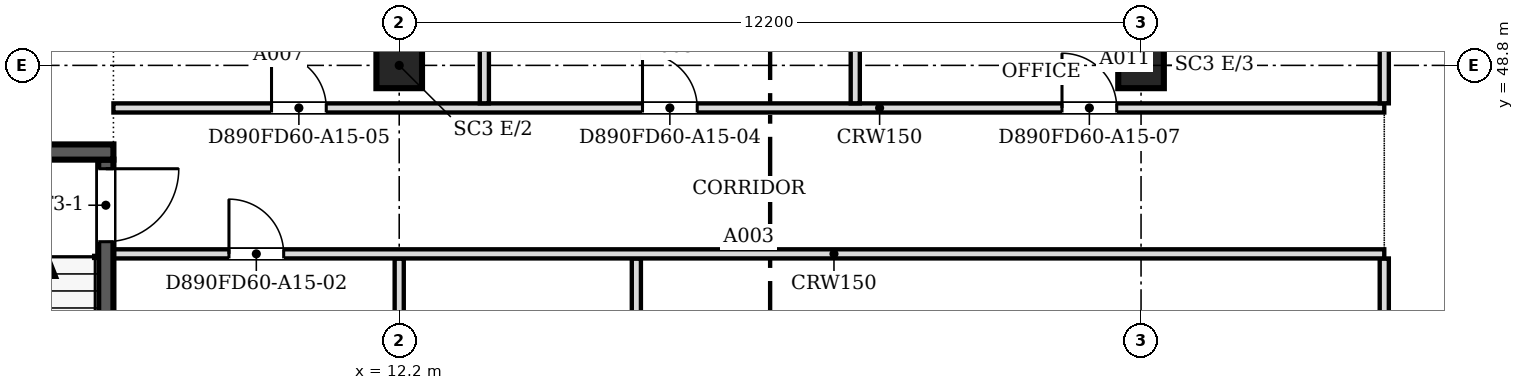
"""IFC4 building model, lengths in metres.
Left out: names, types, materials, properties, quantities, classifications, styles, units other than length and angle.
Written with IfcOpenShell. Run it as: python <this file> out.ifc"""

import sys

from ifc_helpers import new_model, si_unit, direction, frame, frame_2d, origin, origin_2d, place, context, subcontext, project, spatial, rectangle, extrude, source, transform, mapped, element, fill, save


model = new_model("IFC4")
c1 = context("Model", 3, precision=1e-05, world=origin(), true_north=direction((0.0, 1.0)))
c2 = subcontext(c1, "Body", "Model", "MODEL_VIEW")
j1 = project(units=[si_unit("LENGTHUNIT", "METRE"), si_unit("PLANEANGLEUNIT", "RADIAN")], contexts=[c1])
p1 = place(None, origin())
s1 = spatial("IfcSite", under=j1, at=p1, CompositionType="ELEMENT")
p2 = place(p1, origin())
s2 = spatial("IfcBuilding", under=s1, at=p2, CompositionType="ELEMENT")
p3 = place(p2, frame((0.0, 0.0, 166.8)))
s3 = spatial("IfcBuildingStorey", under=s2, at=p3, CompositionType="ELEMENT", Elevation=166.8)
for number, where, z_axis, x_axis in (
    (1, (12.2, 48.8, 0.0), (0.0, 0.0, 1.0), (1.0, 0.0, 0.0)),
    (2, (24.4, 48.8, 0.0), (0.0, 0.0, 1.0), (1.0, 0.0, 0.0)),
):
    element("IfcColumn", number, at=place(p3, frame(where, z_axis=z_axis, x_axis=x_axis)), inside=s3, PredefinedType="COLUMN", context=c2, shape_type="SweptSolid", body=[
        extrude(rectangle(XDim=0.75, YDim=0.75, at=origin_2d()), origin(), (0.0, 0.0, 1.0), 3.6),
    ])
p4 = place(p3, frame((3.6, 47.375, 0.0), z_axis=(0.0, 0.0, 1.0), x_axis=(1.0, 0.0, 0.0)))
e3 = element("IfcWall", 3, at=p4, inside=s3, PredefinedType="SOLIDWALL", context=c2, shape_type="SweptSolid", body=[
    extrude(rectangle(XDim=3.9, YDim=0.25, at=frame_2d((1.95, 0.0))), origin(), (0.0, 0.0, 1.0), 3.8),
])
p5 = place(p3, frame((7.375, 47.25, 0.0), z_axis=(0.0, 0.0, 1.0), x_axis=(0.0, -1.0, 0.0)))
e4 = element("IfcWall", 4, at=p5, inside=s3, PredefinedType="SOLIDWALL", context=c2, shape_type="SweptSolid", body=[
    extrude(rectangle(XDim=8.0, YDim=0.25, at=frame_2d((4.0, 0.0))), origin(), (0.0, 0.0, 1.0), 3.8),
])
m1 = source(origin(), c2, "Body", "SweptSolid", [
    extrude(rectangle(XDim=1.2, YDim=2.1, at=frame_2d((0.6, 1.05))), frame((0.0, 0.135, 0.0), z_axis=(0.0, -1.0, 0.0), x_axis=(1.0, 0.0, 0.0)), (0.0, 0.0, 1.0), 0.27),
])
p6 = place(p5, frame((0.15, 0.0, 0.0)))
e5 = element("IfcOpeningElement", 5, at=p6, cuts=e4, PredefinedType="OPENING", context=c2, shape_type="MappedRepresentation", body=[
    mapped(m1, transform((0.0, 0.0, 0.0), scale=1.0)),
])
p7 = place(p3, frame((28.4, 18.8, 0.0), z_axis=(0.0, 0.0, 1.0), x_axis=(0.0, 1.0, 0.0)))
e6 = element("IfcWall", 6, at=p7, inside=s3, PredefinedType="PARTITIONING", context=c2, shape_type="SweptSolid", body=[
    extrude(rectangle(XDim=26.824, YDim=0.15, at=frame_2d((13.412, 0.0))), origin(), (0.0, 0.0, 1.0), 3.067),
])
m2 = source(origin(), c2, "Body", "SweptSolid", [
    extrude(rectangle(XDim=0.9, YDim=2.1, at=frame_2d((0.45, 1.05))), frame((0.0, 0.085, 0.0), z_axis=(0.0, -1.0, 0.0), x_axis=(1.0, 0.0, 0.0)), (0.0, 0.0, 1.0), 0.17),
])
p8 = place(p7, frame((1.3, 0.0, 0.0)))
e7 = element("IfcOpeningElement", 7, at=p8, cuts=e6, PredefinedType="OPENING", context=c2, shape_type="MappedRepresentation", body=[
    mapped(m2, transform((0.0, 0.0, 0.0), scale=1.0)),
])
m3 = source(origin(), c2, "Body", "SweptSolid", [
    extrude(rectangle(XDim=1.0, YDim=2.1, at=frame_2d((0.5, 1.05))), frame((0.0, 0.085, 0.0), z_axis=(0.0, -1.0, 0.0), x_axis=(1.0, 0.0, 0.0)), (0.0, 0.0, 1.0), 0.17),
])
p9 = place(p7, frame((23.351, 0.0, 0.0)))
e8 = element("IfcOpeningElement", 8, at=p9, cuts=e6, PredefinedType="OPENING", context=c2, shape_type="MappedRepresentation", body=[
    mapped(m3, transform((0.0, 0.0, 0.0), scale=1.0)),
])
p10 = place(p7, frame((8.1, 0.0, 0.0)))
e9 = element("IfcOpeningElement", 9, at=p10, cuts=e6, PredefinedType="OPENING", context=c2, shape_type="MappedRepresentation", body=[
    mapped(m3, transform((0.0, 0.0, 0.0), scale=1.0)),
])
p11 = place(p7, frame((15.8, 0.0, 0.0)))
e10 = element("IfcOpeningElement", 10, at=p11, cuts=e6, PredefinedType="OPENING", context=c2, shape_type="MappedRepresentation", body=[
    mapped(m2, transform((0.0, 0.0, 0.0), scale=1.0)),
])
p12 = place(p3, frame((16.1, 39.65, 0.0), z_axis=(0.0, 0.0, 1.0), x_axis=(0.0, 1.0, 0.0)))
e11 = element("IfcWall", 11, at=p12, inside=s3, PredefinedType="PARTITIONING", context=c2, shape_type="SweptSolid", body=[
    extrude(rectangle(XDim=5.974, YDim=0.15, at=frame_2d((2.987, 0.0))), origin(), (0.0, 0.0, 1.0), 3.067),
])
p13 = place(p12, frame((2.5, 0.0, 0.0)))
e12 = element("IfcOpeningElement", 12, at=p13, cuts=e11, PredefinedType="OPENING", context=c2, shape_type="MappedRepresentation", body=[
    mapped(m2, transform((0.0, 0.0, 0.0), scale=1.0)),
])
p14 = place(p3, frame((12.2, 39.726, 0.0), z_axis=(0.0, 0.0, 1.0), x_axis=(0.0, 1.0, 0.0)))
e13 = element("IfcWall", 13, at=p14, inside=s3, PredefinedType="PARTITIONING", context=c2, shape_type="SweptSolid", body=[
    extrude(rectangle(XDim=5.898, YDim=0.15, at=frame_2d((2.949, 0.0))), origin(), (0.0, 0.0, 1.0), 3.067),
])
p15 = place(p3, frame((28.4, 45.7, 0.0), z_axis=(0.0, 0.0, 1.0), x_axis=(-1.0, 0.0, 0.0)))
e14 = element("IfcWall", 14, at=p15, inside=s3, PredefinedType="PARTITIONING", context=c2, shape_type="SweptSolid", body=[
    extrude(rectangle(XDim=20.9, YDim=0.15, at=frame_2d((10.45, 0.0))), origin(), (0.0, 0.0, 1.0), 3.067),
])
p16 = place(p15, frame((18.1, 0.0, 0.0)))
e15 = element("IfcOpeningElement", 15, at=p16, cuts=e14, PredefinedType="OPENING", context=c2, shape_type="MappedRepresentation", body=[
    mapped(m2, transform((0.0, 0.0, 0.0), scale=1.0)),
])
p17 = place(p3, frame((7.5, 48.1, 0.0), z_axis=(0.0, 0.0, 1.0), x_axis=(1.0, 0.0, 0.0)))
e16 = element("IfcWall", 16, at=p17, inside=s3, PredefinedType="PARTITIONING", context=c2, shape_type="SweptSolid", body=[
    extrude(rectangle(XDim=20.9, YDim=0.15, at=frame_2d((10.45, 0.0))), origin(), (0.0, 0.0, 1.0), 3.067),
])
p18 = place(p17, frame((8.701, 0.0, 0.0)))
e17 = element("IfcOpeningElement", 17, at=p18, cuts=e16, PredefinedType="OPENING", context=c2, shape_type="MappedRepresentation", body=[
    mapped(m2, transform((0.0, 0.0, 0.0), scale=1.0)),
])
p19 = place(p17, frame((2.6, 0.0, 0.0)))
e18 = element("IfcOpeningElement", 18, at=p19, cuts=e16, PredefinedType="OPENING", context=c2, shape_type="MappedRepresentation", body=[
    mapped(m2, transform((0.0, 0.0, 0.0), scale=1.0)),
])
p20 = place(p17, frame((15.6, 0.0, 0.0)))
e19 = element("IfcOpeningElement", 19, at=p20, cuts=e16, PredefinedType="OPENING", context=c2, shape_type="MappedRepresentation", body=[
    mapped(m2, transform((0.0, 0.0, 0.0), scale=1.0)),
])
p21 = place(p3, frame((13.6, 48.176, 0.0), z_axis=(0.0, 0.0, 1.0), x_axis=(0.0, 1.0, 0.0)))
e20 = element("IfcWall", 20, at=p21, inside=s3, PredefinedType="PARTITIONING", context=c2, shape_type="SweptSolid", body=[
    extrude(rectangle(XDim=2.924, YDim=0.15, at=frame_2d((1.462, 0.0))), origin(), (0.0, 0.0, 1.0), 3.067),
])
p22 = place(p3, frame((19.7, 48.176, 0.0), z_axis=(0.0, 0.0, 1.0), x_axis=(0.0, 1.0, 0.0)))
e21 = element("IfcWall", 21, at=p22, inside=s3, PredefinedType="PARTITIONING", context=c2, shape_type="SweptSolid", body=[
    extrude(rectangle(XDim=6.224, YDim=0.15, at=frame_2d((3.112, 0.0))), origin(), (0.0, 0.0, 1.0), 3.067),
])
p23 = place(p3, frame((28.4, 48.176, 0.0), z_axis=(0.0, 0.0, 1.0), x_axis=(0.0, 1.0, 0.0)))
e22 = element("IfcWall", 22, at=p23, inside=s3, PredefinedType="PARTITIONING", context=c2, shape_type="SweptSolid", body=[
    extrude(rectangle(XDim=2.549, YDim=0.15, at=frame_2d((1.274, 0.0))), origin(), (0.0, 0.0, 1.0), 3.067),
])
m4 = source(origin(), c2, "Body", "SweptSolid", [
    extrude(rectangle(XDim=1.2, YDim=2.1, at=frame_2d((0.6, 1.05))), frame((0.0, 0.025, 0.0), z_axis=(0.0, -1.0, 0.0), x_axis=(1.0, 0.0, 0.0)), (0.0, 0.0, 1.0), 0.05),
])
p24 = place(p6, origin())
e23 = element("IfcDoor", 23, at=p24, inside=s3, OperationType="SINGLE_SWING_LEFT", PredefinedType="DOOR", context=c2, shape_type="MappedRepresentation", body=[
    mapped(m4, transform((0.0, 0.0, 0.0), scale=1.0)),
])
fill(e5, e23)
m5 = source(origin(), c2, "Body", "SweptSolid", [
    extrude(rectangle(XDim=0.9, YDim=2.1, at=frame_2d((0.45, 1.05))), frame((0.0, 0.025, 0.0), z_axis=(0.0, -1.0, 0.0), x_axis=(1.0, 0.0, 0.0)), (0.0, 0.0, 1.0), 0.05),
])
p25 = place(p16, origin())
e24 = element("IfcDoor", 24, at=p25, inside=s3, OperationType="SINGLE_SWING_RIGHT", PredefinedType="DOOR", context=c2, shape_type="MappedRepresentation", body=[
    mapped(m5, transform((0.0, 0.0, 0.0), scale=1.0)),
])
fill(e15, e24)
p26 = place(p18, origin())
e25 = element("IfcDoor", 25, at=p26, inside=s3, OperationType="SINGLE_SWING_LEFT", PredefinedType="DOOR", context=c2, shape_type="MappedRepresentation", body=[
    mapped(m5, transform((0.0, 0.0, 0.0), scale=1.0)),
])
fill(e17, e25)
p27 = place(p19, origin())
e26 = element("IfcDoor", 26, at=p27, inside=s3, OperationType="SINGLE_SWING_LEFT", PredefinedType="DOOR", context=c2, shape_type="MappedRepresentation", body=[
    mapped(m5, transform((0.0, 0.0, 0.0), scale=1.0)),
])
fill(e18, e26)
p28 = place(p20, origin())
e27 = element("IfcDoor", 27, at=p28, inside=s3, OperationType="SINGLE_SWING_LEFT", PredefinedType="DOOR", context=c2, shape_type="MappedRepresentation", body=[
    mapped(m5, transform((0.0, 0.0, 0.0), scale=1.0)),
])
fill(e19, e27)
save(model, sys.argv[1])
